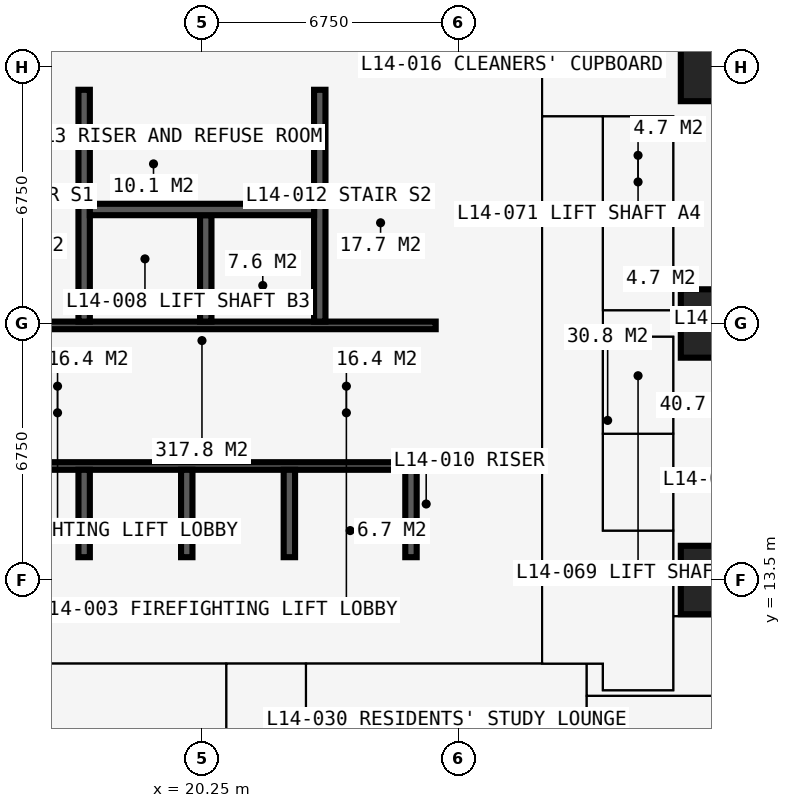
"""IFC4 building model, lengths in metres.
Left out: names, types, materials, properties, quantities, classifications, styles, units other than length and angle.
Written with IfcOpenShell. Run it as: python <this file> out.ifc"""

import sys

from ifc_helpers import new_model, si_unit, direction, frame, frame_2d, origin, origin_2d, place, context, subcontext, project, spatial, rectangle, extrude, element, fill, save


model = new_model("IFC4")
c1 = context("Model", 3, precision=1e-05, world=origin(), true_north=direction((0.0, 1.0)))
c2 = subcontext(c1, "Body", "Model", "MODEL_VIEW")
j1 = project(units=[si_unit("LENGTHUNIT", "METRE"), si_unit("PLANEANGLEUNIT", "RADIAN")], contexts=[c1])
p1 = place(None, origin())
s1 = spatial("IfcSite", under=j1, at=p1, CompositionType="ELEMENT")
p2 = place(p1, origin())
s2 = spatial("IfcBuilding", under=s1, at=p2, CompositionType="ELEMENT")
p3 = place(p2, frame((0.0, 0.0, 54.0)))
s3 = spatial("IfcBuildingStorey", under=s2, at=p3, CompositionType="ELEMENT", Elevation=54.0)
for number, where, z_axis, x_axis in (
    (1, (33.75, 13.5, 0.0), (0.0, 0.0, 1.0), (1.0, 0.0, 0.0)),
    (2, (33.75, 20.25, 0.0), (0.0, 0.0, 1.0), (1.0, 0.0, 0.0)),
    (3, (33.75, 27.0, 0.0), (0.0, 0.0, 1.0), (1.0, 0.0, 0.0)),
):
    element("IfcColumn", number, at=place(p3, frame(where, z_axis=z_axis, x_axis=x_axis)), inside=s3, PredefinedType="COLUMN", context=c2, shape_type="SweptSolid", body=[
        extrude(rectangle(XDim=1.8, YDim=1.8, at=origin_2d()), origin(), (0.0, 0.0, 1.0), 3.6),
    ])
p4 = place(p3, frame((12.9, 13.5, 0.0), z_axis=(0.0, 0.0, 1.0), x_axis=(1.0, 0.0, 0.0)))
e4 = element("IfcWall", 4, at=p4, inside=s3, PredefinedType="SHEAR", context=c2, shape_type="SweptSolid", body=[
    extrude(rectangle(XDim=14.7, YDim=1.2, at=frame_2d((7.35, 0.0))), origin(), (0.0, 0.0, 1.0), 3.6),
])
p5 = place(p3, frame((27.0, 14.1, 0.0), z_axis=(0.0, 0.0, 1.0), x_axis=(0.0, 1.0, 0.0)))
e5 = element("IfcWall", 5, at=p5, inside=s3, PredefinedType="SHEAR", context=c2, shape_type="SweptSolid", body=[
    extrude(rectangle(XDim=12.3, YDim=1.2, at=frame_2d((6.15, 0.0))), origin(), (0.0, 0.0, 1.0), 3.6),
])
p6 = place(p5, frame((3.65, 0.0, 0.0)))
e6 = element("IfcOpeningElement", 6, at=p6, cuts=e5, PredefinedType="OPENING", context=c2, shape_type="SweptSolid", body=[
    extrude(rectangle(XDim=1.2, YDim=2.2, at=frame_2d((0.6, 1.1))), frame((0.0, 0.61, 0.0), z_axis=(0.0, -1.0, 0.0), x_axis=(1.0, 0.0, 0.0)), (0.0, 0.0, 1.0), 1.22),
])
p7 = place(p3, frame((27.6, 27.0, 0.0), z_axis=(0.0, 0.0, 1.0), x_axis=(-1.0, 0.0, 0.0)))
e7 = element("IfcWall", 7, at=p7, inside=s3, PredefinedType="SHEAR", context=c2, shape_type="SweptSolid", body=[
    extrude(rectangle(XDim=14.7, YDim=1.2, at=frame_2d((7.35, 0.0))), origin(), (0.0, 0.0, 1.0), 3.6),
])
p8 = place(p7, frame((4.55, 0.0, 0.0)))
e8 = element("IfcOpeningElement", 8, at=p8, cuts=e7, PredefinedType="OPENING", context=c2, shape_type="SweptSolid", body=[
    extrude(rectangle(XDim=0.9, YDim=2.2, at=frame_2d((0.45, 1.1))), frame((0.0, 0.61, 0.0), z_axis=(0.0, -1.0, 0.0), x_axis=(1.0, 0.0, 0.0)), (0.0, 0.0, 1.0), 1.22),
])
p9 = place(p7, frame((7.525, 0.0, 0.0)))
e9 = element("IfcOpeningElement", 9, at=p9, cuts=e7, PredefinedType="OPENING", context=c2, shape_type="SweptSolid", body=[
    extrude(rectangle(XDim=1.0, YDim=2.2, at=frame_2d((0.5, 1.1))), frame((0.0, 0.61, 0.0), z_axis=(0.0, -1.0, 0.0), x_axis=(1.0, 0.0, 0.0)), (0.0, 0.0, 1.0), 1.22),
])
p10 = place(p3, frame((14.1, 16.5, 0.0), z_axis=(0.0, 0.0, 1.0), x_axis=(1.0, 0.0, 0.0)))
e10 = element("IfcWall", 10, at=p10, inside=s3, PredefinedType="SHEAR", context=c2, shape_type="SweptSolid", body=[
    extrude(rectangle(XDim=12.3, YDim=0.2, at=frame_2d((6.15, 0.0))), origin(), (0.0, 0.0, 1.0), 3.6),
])
p11 = place(p10, frame((0.9, 0.0, 0.0)))
e11 = element("IfcOpeningElement", 11, at=p11, cuts=e10, PredefinedType="OPENING", context=c2, shape_type="SweptSolid", body=[
    extrude(rectangle(XDim=1.1, YDim=2.2, at=frame_2d((0.55, 1.1))), frame((0.0, 0.11, 0.0), z_axis=(0.0, -1.0, 0.0), x_axis=(1.0, 0.0, 0.0)), (0.0, 0.0, 1.0), 0.22),
])
p12 = place(p10, frame((9.5, 0.0, 0.0)))
e12 = element("IfcOpeningElement", 12, at=p12, cuts=e10, PredefinedType="OPENING", context=c2, shape_type="SweptSolid", body=[
    extrude(rectangle(XDim=1.1, YDim=2.2, at=frame_2d((0.55, 1.1))), frame((0.0, 0.11, 0.0), z_axis=(0.0, -1.0, 0.0), x_axis=(1.0, 0.0, 0.0)), (0.0, 0.0, 1.0), 0.22),
])
p13 = place(p3, frame((14.1, 20.2, 0.0), z_axis=(0.0, 0.0, 1.0), x_axis=(1.0, 0.0, 0.0)))
e13 = element("IfcWall", 13, at=p13, inside=s3, PredefinedType="SHEAR", context=c2, shape_type="SweptSolid", body=[
    extrude(rectangle(XDim=12.3, YDim=0.2, at=frame_2d((6.15, 0.0))), origin(), (0.0, 0.0, 1.0), 3.6),
])
p14 = place(p13, frame((0.35, 0.0, 0.0)))
e14 = element("IfcOpeningElement", 14, at=p14, cuts=e13, PredefinedType="OPENING", context=c2, shape_type="SweptSolid", body=[
    extrude(rectangle(XDim=1.1, YDim=2.2, at=frame_2d((0.55, 1.1))), frame((0.0, 0.11, 0.0), z_axis=(0.0, -1.0, 0.0), x_axis=(1.0, 0.0, 0.0)), (0.0, 0.0, 1.0), 0.22),
])
p15 = place(p13, frame((9.75, 0.0, 0.0)))
e15 = element("IfcOpeningElement", 15, at=p15, cuts=e13, PredefinedType="OPENING", context=c2, shape_type="SweptSolid", body=[
    extrude(rectangle(XDim=1.1, YDim=2.2, at=frame_2d((0.55, 1.1))), frame((0.0, 0.11, 0.0), z_axis=(0.0, -1.0, 0.0), x_axis=(1.0, 0.0, 0.0)), (0.0, 0.0, 1.0), 0.22),
])
for number, where, z_axis, x_axis in (
    (16, (17.15, 20.3, 0.0), (0.0, 0.0, 1.0), (0.0, 1.0, 0.0)),
    (17, (23.35, 20.3, 0.0), (0.0, 0.0, 1.0), (0.0, 1.0, 0.0)),
):
    element("IfcWall", number, at=place(p3, frame(where, z_axis=z_axis, x_axis=x_axis)), inside=s3, PredefinedType="SHEAR", context=c2, shape_type="SweptSolid", body=[
        extrude(rectangle(XDim=6.1, YDim=0.3, at=frame_2d((3.05, 0.0))), origin(), (0.0, 0.0, 1.0), 3.6),
    ])
p16 = place(p3, frame((20.35, 20.3, 0.0), z_axis=(0.0, 0.0, 1.0), x_axis=(0.0, 1.0, 0.0)))
e18 = element("IfcWall", 18, at=p16, inside=s3, PredefinedType="SHEAR", context=c2, shape_type="SweptSolid", body=[
    extrude(rectangle(XDim=2.8, YDim=0.3, at=frame_2d((1.4, 0.0))), origin(), (0.0, 0.0, 1.0), 3.6),
])
p17 = place(p3, frame((17.3, 23.25, 0.0), z_axis=(0.0, 0.0, 1.0), x_axis=(1.0, 0.0, 0.0)))
e19 = element("IfcWall", 19, at=p17, inside=s3, PredefinedType="SHEAR", context=c2, shape_type="SweptSolid", body=[
    extrude(rectangle(XDim=5.9, YDim=0.3, at=frame_2d((2.95, 0.0))), origin(), (0.0, 0.0, 1.0), 3.6),
])
for number, where, z_axis, x_axis in (
    (20, (17.15, 14.1, 0.0), (0.0, 0.0, 1.0), (0.0, 1.0, 0.0)),
    (21, (19.85, 14.1, 0.0), (0.0, 0.0, 1.0), (0.0, 1.0, 0.0)),
    (22, (22.55, 14.1, 0.0), (0.0, 0.0, 1.0), (0.0, 1.0, 0.0)),
    (23, (25.75, 14.1, 0.0), (0.0, 0.0, 1.0), (0.0, 1.0, 0.0)),
):
    element("IfcWall", number, at=place(p3, frame(where, z_axis=z_axis, x_axis=x_axis)), inside=s3, PredefinedType="SHEAR", context=c2, shape_type="SweptSolid", body=[
        extrude(rectangle(XDim=2.3, YDim=0.3, at=frame_2d((1.15, 0.0))), origin(), (0.0, 0.0, 1.0), 3.6),
    ])
p18 = place(p3, frame((18.875, 16.6, 0.0), z_axis=(0.0, 0.0, 1.0), x_axis=(0.0, 1.0, 0.0)))
e24 = element("IfcWall", 24, at=p18, inside=s3, PredefinedType="PARTITIONING", context=c2, shape_type="SweptSolid", body=[
    extrude(rectangle(XDim=3.5, YDim=0.15, at=frame_2d((1.75, 0.0))), origin(), (0.0, 0.0, 1.0), 3.375),
])
p19 = place(p18, frame((1.15, 0.0, 0.0)))
e25 = element("IfcOpeningElement", 25, at=p19, cuts=e24, PredefinedType="OPENING", context=c2, shape_type="SweptSolid", body=[
    extrude(rectangle(XDim=1.2, YDim=2.2, at=frame_2d((0.6, 1.1))), frame((0.0, 0.085, 0.0), z_axis=(0.0, -1.0, 0.0), x_axis=(1.0, 0.0, 0.0)), (0.0, 0.0, 1.0), 0.17),
])
p20 = place(p3, frame((21.625, 16.6, 0.0), z_axis=(0.0, 0.0, 1.0), x_axis=(0.0, 1.0, 0.0)))
e26 = element("IfcWall", 26, at=p20, inside=s3, PredefinedType="PARTITIONING", context=c2, shape_type="SweptSolid", body=[
    extrude(rectangle(XDim=3.5, YDim=0.15, at=frame_2d((1.75, 0.0))), origin(), (0.0, 0.0, 1.0), 3.375),
])
p21 = place(p20, frame((1.15, 0.0, 0.0)))
e27 = element("IfcOpeningElement", 27, at=p21, cuts=e26, PredefinedType="OPENING", context=c2, shape_type="SweptSolid", body=[
    extrude(rectangle(XDim=1.2, YDim=2.2, at=frame_2d((0.6, 1.1))), frame((0.0, 0.085, 0.0), z_axis=(0.0, -1.0, 0.0), x_axis=(1.0, 0.0, 0.0)), (0.0, 0.0, 1.0), 0.17),
])
p22 = place(p3, frame((20.725, 23.4, 0.0), z_axis=(0.0, 0.0, 1.0), x_axis=(0.0, 1.0, 0.0)))
e28 = element("IfcWall", 28, at=p22, inside=s3, PredefinedType="PARTITIONING", context=c2, shape_type="SweptSolid", body=[
    extrude(rectangle(XDim=3.0, YDim=0.15, at=frame_2d((1.5, 0.0))), origin(), (0.0, 0.0, 1.0), 3.375),
])
p23 = place(p3, frame((10.125, 11.3, 0.0), z_axis=(0.0, 0.0, 1.0), x_axis=(1.0, 0.0, 0.0)))
e29 = element("IfcWall", 29, at=p23, inside=s3, PredefinedType="PARTITIONING", context=c2, shape_type="SweptSolid", body=[
    extrude(rectangle(XDim=20.675, YDim=0.15, at=frame_2d((10.337, 0.0))), origin(), (0.0, 0.0, 1.0), 3.375),
])
p24 = place(p23, frame((1.775, 0.0, 0.0)))
e30 = element("IfcOpeningElement", 30, at=p24, cuts=e29, PredefinedType="OPENING", context=c2, shape_type="SweptSolid", body=[
    extrude(rectangle(XDim=1.0, YDim=2.2, at=frame_2d((0.5, 1.1))), frame((0.0, 0.085, 0.0), z_axis=(0.0, -1.0, 0.0), x_axis=(1.0, 0.0, 0.0)), (0.0, 0.0, 1.0), 0.17),
])
p25 = place(p23, frame((11.312, 0.0, 0.0)))
e31 = element("IfcOpeningElement", 31, at=p25, cuts=e29, PredefinedType="OPENING", context=c2, shape_type="SweptSolid", body=[
    extrude(rectangle(XDim=1.0, YDim=2.2, at=frame_2d((0.5, 1.1))), frame((0.0, 0.085, 0.0), z_axis=(0.0, -1.0, 0.0), x_axis=(1.0, 0.0, 0.0)), (0.0, 0.0, 1.0), 0.17),
])
for number, where, z_axis, x_axis in (
    (32, (20.887, 5.65, 0.0), (0.0, 0.0, 1.0), (0.0, 1.0, 0.0)),
    (33, (22.988, 5.65, 0.0), (0.0, 0.0, 1.0), (0.0, 1.0, 0.0)),
):
    element("IfcWall", number, at=place(p3, frame(where, z_axis=z_axis, x_axis=x_axis)), inside=s3, PredefinedType="PARTITIONING", context=c2, shape_type="SweptSolid", body=[
        extrude(rectangle(XDim=5.65, YDim=0.15, at=frame_2d((2.825, 0.0))), origin(), (0.0, 0.0, 1.0), 3.375),
    ])
p26 = place(p3, frame((29.2, 11.3, 0.0), z_axis=(0.0, 0.0, 1.0), x_axis=(0.0, 1.0, 0.0)))
e34 = element("IfcWall", 34, at=p26, inside=s3, PredefinedType="PARTITIONING", context=c2, shape_type="SweptSolid", body=[
    extrude(rectangle(XDim=17.9, YDim=0.2, at=frame_2d((8.95, 0.0))), origin(), (0.0, 0.0, 1.0), 3.375),
])
p27 = place(p26, frame((8.35, 0.0, 0.0)))
e35 = element("IfcOpeningElement", 35, at=p27, cuts=e34, PredefinedType="OPENING", context=c2, shape_type="SweptSolid", body=[
    extrude(rectangle(XDim=1.2, YDim=2.2, at=frame_2d((0.6, 1.1))), frame((0.0, 0.11, 0.0), z_axis=(0.0, -1.0, 0.0), x_axis=(1.0, 0.0, 0.0)), (0.0, 0.0, 1.0), 0.22),
])
p28 = place(p3, frame((29.2, 25.7, 0.0), z_axis=(0.0, 0.0, 1.0), x_axis=(1.0, 0.0, 0.0)))
e36 = element("IfcWall", 36, at=p28, inside=s3, PredefinedType="SHEAR", context=c2, shape_type="SweptSolid", body=[
    extrude(rectangle(XDim=3.45, YDim=0.1, at=frame_2d((1.725, 0.0))), origin(), (0.0, 0.0, 1.0), 3.375),
])
p29 = place(p3, frame((30.375, -0.734, 0.0), z_axis=(0.0, 0.0, 1.0), x_axis=(0.0, 1.0, 0.0)))
e37 = element("IfcWall", 37, at=p29, inside=s3, PredefinedType="PARTITIONING", context=c2, shape_type="SweptSolid", body=[
    extrude(rectangle(XDim=12.034, YDim=0.15, at=frame_2d((6.017, 0.0))), origin(), (0.0, 0.0, 1.0), 3.375),
])
p30 = place(p29, frame((5.134, 0.0, 0.0)))
e38 = element("IfcOpeningElement", 38, at=p30, cuts=e37, PredefinedType="OPENING", context=c2, shape_type="SweptSolid", body=[
    extrude(rectangle(XDim=1.0, YDim=2.2, at=frame_2d((0.5, 1.1))), frame((0.0, 0.085, 0.0), z_axis=(0.0, -1.0, 0.0), x_axis=(1.0, 0.0, 0.0)), (0.0, 0.0, 1.0), 0.17),
])
p31 = place(p3, frame((30.375, 10.45, 0.0), z_axis=(0.0, 0.0, 1.0), x_axis=(1.0, 0.0, 0.0)))
e39 = element("IfcWall", 39, at=p31, inside=s3, PredefinedType="PARTITIONING", context=c2, shape_type="SweptSolid", body=[
    extrude(rectangle(XDim=4.475, YDim=0.15, at=frame_2d((2.238, 0.0))), origin(), (0.0, 0.0, 1.0), 3.375),
])
p32 = place(p31, frame((2.35, 0.0, 0.0)))
e40 = element("IfcOpeningElement", 40, at=p32, cuts=e39, PredefinedType="OPENING", context=c2, shape_type="SweptSolid", body=[
    extrude(rectangle(XDim=0.95, YDim=2.2, at=frame_2d((0.475, 1.1))), frame((0.0, 0.085, 0.0), z_axis=(0.0, -1.0, 0.0), x_axis=(1.0, 0.0, 0.0)), (0.0, 0.0, 1.0), 0.17),
])
p33 = place(p3, frame((30.8, 10.6, 0.0), z_axis=(0.0, 0.0, 1.0), x_axis=(0.0, 1.0, 0.0)))
e41 = element("IfcWall", 41, at=p33, inside=s3, PredefinedType="PARTITIONING", context=c2, shape_type="SweptSolid", body=[
    extrude(rectangle(XDim=0.7, YDim=0.15, at=frame_2d((0.35, 0.0))), origin(), (0.0, 0.0, 1.0), 3.375),
])
p34 = place(p3, frame((30.8, 10.6, 0.0), z_axis=(0.0, 0.0, 1.0), x_axis=(1.0, 0.0, 0.0)))
e42 = element("IfcWall", 42, at=p34, inside=s3, PredefinedType="PARTITIONING", context=c2, shape_type="SweptSolid", body=[
    extrude(rectangle(XDim=1.85, YDim=0.15, at=frame_2d((0.925, 0.0))), origin(), (0.0, 0.0, 1.0), 3.375),
])
p35 = place(p3, frame((30.8, 14.8, 0.0), z_axis=(0.0, 0.0, 1.0), x_axis=(0.0, 1.0, 0.0)))
e43 = element("IfcWall", 43, at=p35, inside=s3, PredefinedType="PARTITIONING", context=c2, shape_type="SweptSolid", body=[
    extrude(rectangle(XDim=10.9, YDim=0.15, at=frame_2d((5.45, 0.0))), origin(), (0.0, 0.0, 1.0), 3.375),
])
p36 = place(p35, frame((0.75, 0.0, 0.0)))
e44 = element("IfcOpeningElement", 44, at=p36, cuts=e43, PredefinedType="OPENING", context=c2, shape_type="SweptSolid", body=[
    extrude(rectangle(XDim=1.1, YDim=2.2, at=frame_2d((0.55, 1.1))), frame((0.0, 0.085, 0.0), z_axis=(0.0, -1.0, 0.0), x_axis=(1.0, 0.0, 0.0)), (0.0, 0.0, 1.0), 0.17),
])
p37 = place(p35, frame((3.25, 0.0, 0.0)))
e45 = element("IfcOpeningElement", 45, at=p37, cuts=e43, PredefinedType="OPENING", context=c2, shape_type="SweptSolid", body=[
    extrude(rectangle(XDim=1.1, YDim=2.2, at=frame_2d((0.55, 1.1))), frame((0.0, 0.085, 0.0), z_axis=(0.0, -1.0, 0.0), x_axis=(1.0, 0.0, 0.0)), (0.0, 0.0, 1.0), 0.17),
])
p38 = place(p35, frame((6.5, 0.0, 0.0)))
e46 = element("IfcOpeningElement", 46, at=p38, cuts=e43, PredefinedType="OPENING", context=c2, shape_type="SweptSolid", body=[
    extrude(rectangle(XDim=1.1, YDim=2.2, at=frame_2d((0.55, 1.1))), frame((0.0, 0.085, 0.0), z_axis=(0.0, -1.0, 0.0), x_axis=(1.0, 0.0, 0.0)), (0.0, 0.0, 1.0), 0.17),
])
p39 = place(p35, frame((9.05, 0.0, 0.0)))
e47 = element("IfcOpeningElement", 47, at=p39, cuts=e43, PredefinedType="OPENING", context=c2, shape_type="SweptSolid", body=[
    extrude(rectangle(XDim=1.1, YDim=2.2, at=frame_2d((0.55, 1.1))), frame((0.0, 0.085, 0.0), z_axis=(0.0, -1.0, 0.0), x_axis=(1.0, 0.0, 0.0)), (0.0, 0.0, 1.0), 0.17),
])
for number, where, z_axis, x_axis in (
    (48, (30.8, 14.8, 0.0), (0.0, 0.0, 1.0), (1.0, 0.0, 0.0)),
    (49, (30.8, 17.35, 0.0), (0.0, 0.0, 1.0), (1.0, 0.0, 0.0)),
    (50, (30.8, 19.9, 0.0), (0.0, 0.0, 1.0), (1.0, 0.0, 0.0)),
    (51, (30.8, 20.6, 0.0), (0.0, 0.0, 1.0), (1.0, 0.0, 0.0)),
    (52, (30.8, 23.15, 0.0), (0.0, 0.0, 1.0), (1.0, 0.0, 0.0)),
):
    element("IfcWall", number, at=place(p3, frame(where, z_axis=z_axis, x_axis=x_axis)), inside=s3, PredefinedType="SHEAR", context=c2, shape_type="SweptSolid", body=[
        extrude(rectangle(XDim=1.85, YDim=0.1, at=frame_2d((0.925, 0.0))), origin(), (0.0, 0.0, 1.0), 3.375),
    ])
p40 = place(p3, frame((32.65, 10.6, 0.0), z_axis=(0.0, 0.0, 1.0), x_axis=(0.0, 1.0, 0.0)))
e53 = element("IfcWall", 53, at=p40, inside=s3, PredefinedType="SHEAR", context=c2, shape_type="SweptSolid", body=[
    extrude(rectangle(XDim=9.3, YDim=0.1, at=frame_2d((4.65, 0.0))), origin(), (0.0, 0.0, 1.0), 3.375),
])
p41 = place(p40, frame((0.5, 0.0, 0.0)))
e54 = element("IfcOpeningElement", 54, at=p41, cuts=e53, PredefinedType="OPENING", context=c2, shape_type="SweptSolid", body=[
    extrude(rectangle(XDim=1.0, YDim=2.2, at=frame_2d((0.5, 1.1))), frame((0.0, 0.06, 0.0), z_axis=(0.0, -1.0, 0.0), x_axis=(1.0, 0.0, 0.0)), (0.0, 0.0, 1.0), 0.12),
])
p42 = place(p3, frame((32.65, 12.55, 0.0), z_axis=(0.0, 0.0, 1.0), x_axis=(1.0, 0.0, 0.0)))
e55 = element("IfcWall", 55, at=p42, inside=s3, PredefinedType="PARTITIONING", context=c2, shape_type="SweptSolid", body=[
    extrude(rectangle(XDim=2.2, YDim=0.15, at=frame_2d((1.1, 0.0))), origin(), (0.0, 0.0, 1.0), 3.375),
])
p43 = place(p3, frame((32.65, 20.6, 0.0), z_axis=(0.0, 0.0, 1.0), x_axis=(0.0, 1.0, 0.0)))
e56 = element("IfcWall", 56, at=p43, inside=s3, PredefinedType="PARTITIONING", context=c2, shape_type="SweptSolid", body=[
    extrude(rectangle(XDim=5.1, YDim=0.15, at=frame_2d((2.55, 0.0))), origin(), (0.0, 0.0, 1.0), 3.375),
])
p44 = place(p12, origin())
e57 = element("IfcDoor", 57, at=p44, inside=s3, OperationType="DOUBLE_DOOR_SLIDING", PredefinedType="DOOR", context=c2, shape_type="SweptSolid", body=[
    extrude(rectangle(XDim=1.1, YDim=2.2, at=frame_2d((0.55, 1.1))), frame((0.0, 0.025, 0.0), z_axis=(0.0, -1.0, 0.0), x_axis=(1.0, 0.0, 0.0)), (0.0, 0.0, 1.0), 0.05),
])
fill(e12, e57)
p45 = place(p6, origin())
e58 = element("IfcDoor", 58, at=p45, inside=s3, OperationType="DOUBLE_DOOR_SINGLE_SWING", PredefinedType="DOOR", context=c2, shape_type="SweptSolid", body=[
    extrude(rectangle(XDim=1.2, YDim=2.2, at=frame_2d((0.6, 1.1))), frame((0.0, 0.025, 0.0), z_axis=(0.0, -1.0, 0.0), x_axis=(1.0, 0.0, 0.0)), (0.0, 0.0, 1.0), 0.05),
])
fill(e6, e58)
p46 = place(p19, origin())
e59 = element("IfcDoor", 59, at=p46, inside=s3, OperationType="DOUBLE_DOOR_SINGLE_SWING", PredefinedType="DOOR", context=c2, shape_type="SweptSolid", body=[
    extrude(rectangle(XDim=1.2, YDim=2.2, at=frame_2d((0.6, 1.1))), frame((0.0, 0.025, 0.0), z_axis=(0.0, -1.0, 0.0), x_axis=(1.0, 0.0, 0.0)), (0.0, 0.0, 1.0), 0.05),
])
fill(e25, e59)
p47 = place(p21, origin())
e60 = element("IfcDoor", 60, at=p47, inside=s3, OperationType="DOUBLE_DOOR_SINGLE_SWING", PredefinedType="DOOR", context=c2, shape_type="SweptSolid", body=[
    extrude(rectangle(XDim=1.2, YDim=2.2, at=frame_2d((0.6, 1.1))), frame((0.0, 0.025, 0.0), z_axis=(0.0, -1.0, 0.0), x_axis=(1.0, 0.0, 0.0)), (0.0, 0.0, 1.0), 0.05),
])
fill(e27, e60)
p48 = place(p8, origin())
e61 = element("IfcDoor", 61, at=p48, inside=s3, OperationType="SINGLE_SWING_LEFT", PredefinedType="DOOR", context=c2, shape_type="SweptSolid", body=[
    extrude(rectangle(XDim=0.9, YDim=2.2, at=frame_2d((0.45, 1.1))), frame((0.0, 0.4, 0.0), z_axis=(0.0, -1.0, 0.0), x_axis=(1.0, 0.0, 0.0)), (0.0, 0.0, 1.0), 0.8),
])
fill(e8, e61)
p49 = place(p9, origin())
e62 = element("IfcDoor", 62, at=p49, inside=s3, OperationType="SINGLE_SWING_LEFT", PredefinedType="DOOR", context=c2, shape_type="SweptSolid", body=[
    extrude(rectangle(XDim=1.0, YDim=2.2, at=frame_2d((0.5, 1.1))), frame((0.0, 0.025, 0.0), z_axis=(0.0, -1.0, 0.0), x_axis=(1.0, 0.0, 0.0)), (0.0, 0.0, 1.0), 0.05),
])
fill(e9, e62)
p50 = place(p15, origin())
e63 = element("IfcDoor", 63, at=p50, inside=s3, OperationType="SINGLE_SWING_LEFT", PredefinedType="DOOR", context=c2, shape_type="SweptSolid", body=[
    extrude(rectangle(XDim=1.1, YDim=2.2, at=frame_2d((0.55, 1.1))), frame((0.0, 0.025, 0.0), z_axis=(0.0, -1.0, 0.0), x_axis=(1.0, 0.0, 0.0)), (0.0, 0.0, 1.0), 0.05),
])
fill(e15, e63)
p51 = place(p25, origin())
e64 = element("IfcDoor", 64, at=p51, inside=s3, OperationType="SINGLE_SWING_LEFT", PredefinedType="DOOR", context=c2, shape_type="SweptSolid", body=[
    extrude(rectangle(XDim=1.0, YDim=2.2, at=frame_2d((0.5, 1.1))), frame((0.0, 0.025, 0.0), z_axis=(0.0, -1.0, 0.0), x_axis=(1.0, 0.0, 0.0)), (0.0, 0.0, 1.0), 0.05),
])
fill(e31, e64)
p52 = place(p41, origin())
e65 = element("IfcDoor", 65, at=p52, inside=s3, OperationType="SINGLE_SWING_LEFT", PredefinedType="DOOR", context=c2, shape_type="SweptSolid", body=[
    extrude(rectangle(XDim=1.0, YDim=2.2, at=frame_2d((0.5, 1.1))), frame((0.0, 0.025, 0.0), z_axis=(0.0, -1.0, 0.0), x_axis=(1.0, 0.0, 0.0)), (0.0, 0.0, 1.0), 0.05),
])
fill(e54, e65)
p53 = place(p32, origin())
e66 = element("IfcDoor", 66, at=p53, inside=s3, OperationType="SINGLE_SWING_LEFT", PredefinedType="DOOR", context=c2, shape_type="SweptSolid", body=[
    extrude(rectangle(XDim=0.95, YDim=2.2, at=frame_2d((0.475, 1.1))), frame((0.0, 0.025, 0.0), z_axis=(0.0, -1.0, 0.0), x_axis=(1.0, 0.0, 0.0)), (0.0, 0.0, 1.0), 0.05),
])
fill(e40, e66)
p54 = place(p36, origin())
e67 = element("IfcDoor", 67, at=p54, inside=s3, OperationType="DOUBLE_DOOR_SLIDING", PredefinedType="DOOR", context=c2, shape_type="SweptSolid", body=[
    extrude(rectangle(XDim=1.1, YDim=2.2, at=frame_2d((0.55, 1.1))), frame((0.0, 0.025, 0.0), z_axis=(0.0, -1.0, 0.0), x_axis=(1.0, 0.0, 0.0)), (0.0, 0.0, 1.0), 0.05),
])
fill(e44, e67)
p55 = place(p37, origin())
e68 = element("IfcDoor", 68, at=p55, inside=s3, OperationType="DOUBLE_DOOR_SLIDING", PredefinedType="DOOR", context=c2, shape_type="SweptSolid", body=[
    extrude(rectangle(XDim=1.1, YDim=2.2, at=frame_2d((0.55, 1.1))), frame((0.0, 0.025, 0.0), z_axis=(0.0, -1.0, 0.0), x_axis=(1.0, 0.0, 0.0)), (0.0, 0.0, 1.0), 0.05),
])
fill(e45, e68)
p56 = place(p38, origin())
e69 = element("IfcDoor", 69, at=p56, inside=s3, OperationType="DOUBLE_DOOR_SLIDING", PredefinedType="DOOR", context=c2, shape_type="SweptSolid", body=[
    extrude(rectangle(XDim=1.1, YDim=2.2, at=frame_2d((0.55, 1.1))), frame((0.0, 0.025, 0.0), z_axis=(0.0, -1.0, 0.0), x_axis=(1.0, 0.0, 0.0)), (0.0, 0.0, 1.0), 0.05),
])
fill(e46, e69)
p57 = place(p39, origin())
e70 = element("IfcDoor", 70, at=p57, inside=s3, OperationType="DOUBLE_DOOR_SLIDING", PredefinedType="DOOR", context=c2, shape_type="SweptSolid", body=[
    extrude(rectangle(XDim=1.1, YDim=2.2, at=frame_2d((0.55, 1.1))), frame((0.0, 0.025, 0.0), z_axis=(0.0, -1.0, 0.0), x_axis=(1.0, 0.0, 0.0)), (0.0, 0.0, 1.0), 0.05),
])
fill(e47, e70)
p58 = place(p27, origin())
e71 = element("IfcDoor", 71, at=p58, inside=s3, OperationType="DOUBLE_DOOR_SINGLE_SWING", PredefinedType="DOOR", context=c2, shape_type="SweptSolid", body=[
    extrude(rectangle(XDim=1.2, YDim=2.2, at=frame_2d((0.6, 1.1))), frame((0.0, 0.025, 0.0), z_axis=(0.0, -1.0, 0.0), x_axis=(1.0, 0.0, 0.0)), (0.0, 0.0, 1.0), 0.05),
])
fill(e35, e71)
save(model, sys.argv[1])
